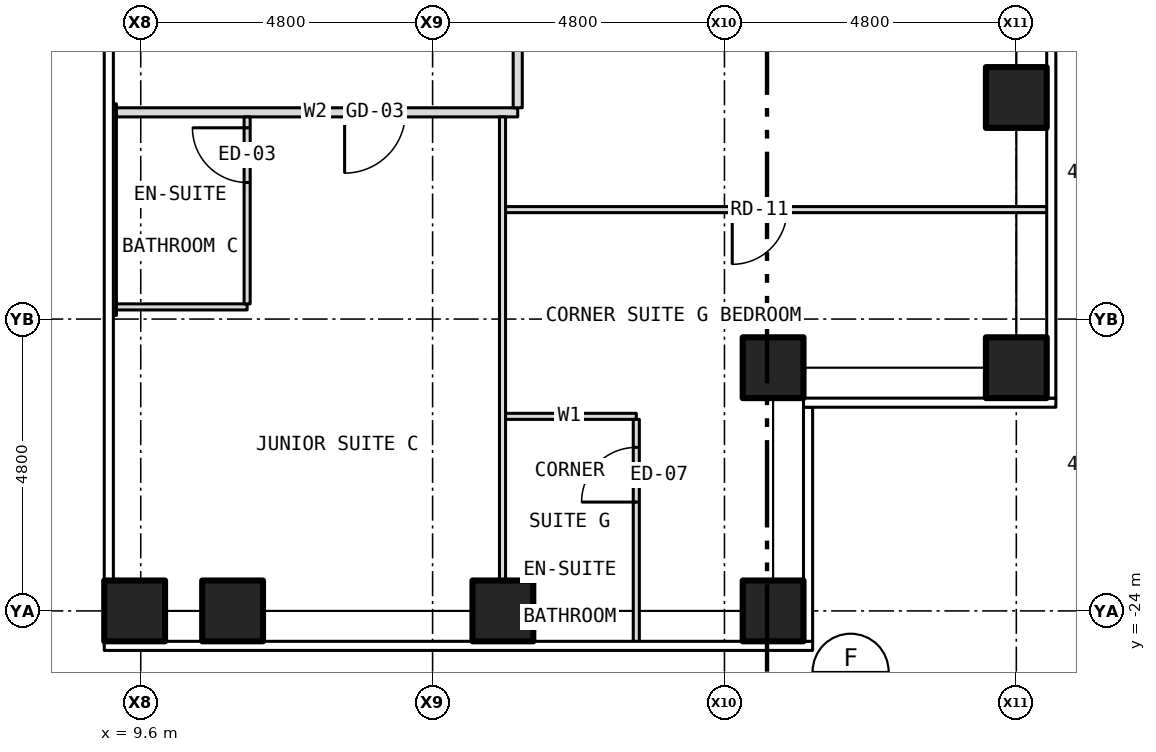
"""IFC4 building model, lengths in metres.
Left out: names, types, materials, properties, quantities, classifications, styles, units other than length and angle.
Written with IfcOpenShell. Run it as: python <this file> out.ifc"""

import sys

from ifc_helpers import new_model, si_unit, direction, frame, frame_2d, origin, origin_2d, place, context, subcontext, project, spatial, rectangle, hollow_rectangle, extrude, element, fill, save


model = new_model("IFC4")
c1 = context("Model", 3, precision=1e-05, world=origin(), true_north=direction((0.0, 1.0)))
c2 = subcontext(c1, "Body", "Model", "MODEL_VIEW")
j1 = project(units=[si_unit("LENGTHUNIT", "METRE"), si_unit("PLANEANGLEUNIT", "RADIAN")], contexts=[c1])
p1 = place(None, origin())
s1 = spatial("IfcSite", under=j1, at=p1, CompositionType="ELEMENT")
p2 = place(p1, origin())
s2 = spatial("IfcBuilding", under=s1, at=p2, CompositionType="ELEMENT")
p3 = place(p2, frame((0.0, 0.0, 77.5)))
s3 = spatial("IfcBuildingStorey", under=s2, at=p3, CompositionType="ELEMENT", Elevation=77.5)
for number, where, z_axis, x_axis in (
    (1, (11.111, -24.0, -0.15), (0.0, 0.0, 1.0), (1.0, 0.0, 0.0)),
    (2, (15.556, -24.0, -0.15), (0.0, 0.0, 1.0), (1.0, 0.0, 0.0)),
    (3, (20.0, -24.0, -0.15), (0.0, 0.0, 1.0), (1.0, 0.0, 0.0)),
    (4, (24.0, -20.0, -0.15), (0.0, 0.0, 1.0), (1.0, 0.0, 0.0)),
    (5, (24.0, -15.556, -0.15), (0.0, 0.0, 1.0), (1.0, 0.0, 0.0)),
    (6, (20.0, -20.0, -0.15), (0.0, 0.0, 1.0), (1.0, 0.0, 0.0)),
    (7, (9.5, -24.0, -0.15), (0.0, 0.0, 1.0), (1.0, 0.0, 0.0)),
):
    element("IfcColumn", number, at=place(p3, frame(where, z_axis=z_axis, x_axis=x_axis)), inside=s3, PredefinedType="COLUMN", context=c2, shape_type="SweptSolid", body=[
        extrude(hollow_rectangle(XDim=1.0, YDim=1.0, WallThickness=0.06, at=origin_2d()), origin(), (0.0, 0.0, 1.0), 3.5),
    ])
p4 = place(p3, frame((15.55, -20.8, 0.0), z_axis=(0.0, 0.0, 1.0), x_axis=(1.0, 0.0, 0.0)))
e8 = element("IfcWall", 8, at=p4, inside=s3, PredefinedType="PARTITIONING", context=c2, shape_type="SweptSolid", body=[
    extrude(rectangle(XDim=2.2, YDim=0.1, at=frame_2d((1.1, 0.0))), origin(), (0.0, 0.0, 1.0), 3.35),
])
p5 = place(p3, frame((9.15, -19.0, 0.0), z_axis=(0.0, 0.0, 1.0), x_axis=(1.0, 0.0, 0.0)))
e9 = element("IfcWall", 9, at=p5, inside=s3, PredefinedType="PARTITIONING", context=c2, shape_type="SweptSolid", body=[
    extrude(rectangle(XDim=2.2, YDim=0.1, at=frame_2d((1.1, 0.0))), origin(), (0.0, 0.0, 1.0), 3.35),
])
p6 = place(p3, frame((15.55, -17.4, 0.0), z_axis=(0.0, 0.0, 1.0), x_axis=(1.0, 0.0, 0.0)))
e10 = element("IfcWall", 10, at=p6, inside=s3, PredefinedType="PARTITIONING", context=c2, shape_type="SweptSolid", body=[
    extrude(rectangle(XDim=8.98, YDim=0.1, at=frame_2d((4.49, 0.0))), origin(), (0.0, 0.0, 1.0), 3.35),
])
p7 = place(p6, frame((3.778, 0.0, 0.0)))
e11 = element("IfcOpeningElement", 11, at=p7, cuts=e10, PredefinedType="OPENING", context=c2, shape_type="SweptSolid", body=[
    extrude(rectangle(XDim=0.9, YDim=2.1, at=frame_2d((0.45, 1.05))), frame((0.0, 0.062, 0.0), z_axis=(0.0, -1.0, 0.0), x_axis=(1.0, 0.0, 0.0)), (0.0, 0.0, 1.0), 0.124),
])
p8 = place(p3, frame((9.15, -15.8, 0.0), z_axis=(0.0, 0.0, 1.0), x_axis=(1.0, 0.0, 0.0)))
e12 = element("IfcWall", 12, at=p8, inside=s3, PredefinedType="PARTITIONING", context=c2, shape_type="SweptSolid", body=[
    extrude(rectangle(XDim=6.65, YDim=0.15, at=frame_2d((3.325, 0.0))), origin(), (0.0, 0.0, 1.0), 3.35),
])
p9 = place(p8, frame((3.803, 0.0, 0.0)))
e13 = element("IfcOpeningElement", 13, at=p9, cuts=e12, PredefinedType="OPENING", context=c2, shape_type="SweptSolid", body=[
    extrude(rectangle(XDim=1.0, YDim=2.1, at=frame_2d((0.5, 1.05))), frame((0.0, 0.087, 0.0), z_axis=(0.0, -1.0, 0.0), x_axis=(1.0, 0.0, 0.0)), (0.0, 0.0, 1.0), 0.174),
])
p10 = place(p3, frame((9.15, -19.14, 0.0), z_axis=(0.0, 0.0, 1.0), x_axis=(0.0, 1.0, 0.0)))
e14 = element("IfcWall", 14, at=p10, inside=s3, PredefinedType="PARTITIONING", context=c2, shape_type="SweptSolid", body=[
    extrude(rectangle(XDim=3.48, YDim=0.1, at=frame_2d((1.74, 0.0))), origin(), (0.0, 0.0, 1.0), 2.733),
])
p11 = place(p3, frame((11.35, -18.95, 0.0), z_axis=(0.0, 0.0, 1.0), x_axis=(0.0, 1.0, 0.0)))
e15 = element("IfcWall", 15, at=p11, inside=s3, PredefinedType="PARTITIONING", context=c2, shape_type="SweptSolid", body=[
    extrude(rectangle(XDim=3.075, YDim=0.1, at=frame_2d((1.538, 0.0))), origin(), (0.0, 0.0, 1.0), 3.35),
])
p12 = place(p11, frame((1.996, 0.0, 0.0)))
e16 = element("IfcOpeningElement", 16, at=p12, cuts=e15, PredefinedType="OPENING", context=c2, shape_type="SweptSolid", body=[
    extrude(rectangle(XDim=0.9, YDim=2.1, at=frame_2d((0.45, 1.05))), frame((0.0, 0.062, 0.0), z_axis=(0.0, -1.0, 0.0), x_axis=(1.0, 0.0, 0.0)), (0.0, 0.0, 1.0), 0.124),
])
p13 = place(p3, frame((15.55, -23.88, 0.0), z_axis=(0.0, 0.0, 1.0), x_axis=(0.0, 1.0, 0.0)))
e17 = element("IfcWall", 17, at=p13, inside=s3, PredefinedType="PARTITIONING", context=c2, shape_type="SweptSolid", body=[
    extrude(rectangle(XDim=8.005, YDim=0.1, at=frame_2d((4.002, 0.0))), origin(), (0.0, 0.0, 1.0), 3.35),
])
p14 = place(p3, frame((15.8, -15.725, 0.0), z_axis=(0.0, 0.0, 1.0), x_axis=(0.0, 1.0, 0.0)))
e18 = element("IfcWall", 18, at=p14, inside=s3, PredefinedType="PARTITIONING", context=c2, shape_type="SweptSolid", body=[
    extrude(rectangle(XDim=4.805, YDim=0.15, at=frame_2d((2.403, 0.0))), origin(), (0.0, 0.0, 1.0), 3.35),
])
p15 = place(p14, frame((3.025, 0.0, 0.0)))
e19 = element("IfcOpeningElement", 19, at=p15, cuts=e18, PredefinedType="OPENING", context=c2, shape_type="SweptSolid", body=[
    extrude(rectangle(XDim=1.0, YDim=2.1, at=frame_2d((0.5, 1.05))), frame((0.0, 0.087, 0.0), z_axis=(0.0, -1.0, 0.0), x_axis=(1.0, 0.0, 0.0)), (0.0, 0.0, 1.0), 0.174),
])
p16 = place(p3, frame((17.75, -24.53, 0.0), z_axis=(0.0, 0.0, 1.0), x_axis=(0.0, 1.0, 0.0)))
e20 = element("IfcWall", 20, at=p16, inside=s3, PredefinedType="PARTITIONING", context=c2, shape_type="SweptSolid", body=[
    extrude(rectangle(XDim=3.68, YDim=0.1, at=frame_2d((1.84, 0.0))), origin(), (0.0, 0.0, 1.0), 3.35),
])
p17 = place(p16, frame((2.32, 0.0, 0.0)))
e21 = element("IfcOpeningElement", 21, at=p17, cuts=e20, PredefinedType="OPENING", context=c2, shape_type="SweptSolid", body=[
    extrude(rectangle(XDim=0.9, YDim=2.1, at=frame_2d((0.45, 1.05))), frame((0.0, 0.062, 0.0), z_axis=(0.0, -1.0, 0.0), x_axis=(1.0, 0.0, 0.0)), (0.0, 0.0, 1.0), 0.124),
])
p18 = place(p9, origin())
e22 = element("IfcDoor", 22, at=p18, inside=s3, OperationType="SINGLE_SWING_LEFT", PredefinedType="DOOR", context=c2, shape_type="SweptSolid", body=[
    extrude(rectangle(XDim=1.0, YDim=2.1, at=frame_2d((0.5, 1.05))), frame((0.0, 0.025, 0.0), z_axis=(0.0, -1.0, 0.0), x_axis=(1.0, 0.0, 0.0)), (0.0, 0.0, 1.0), 0.05),
])
fill(e13, e22)
p19 = place(p12, origin())
e23 = element("IfcDoor", 23, at=p19, inside=s3, OperationType="SINGLE_SWING_RIGHT", PredefinedType="DOOR", context=c2, shape_type="SweptSolid", body=[
    extrude(rectangle(XDim=0.9, YDim=2.1, at=frame_2d((0.45, 1.05))), frame((0.0, 0.025, 0.0), z_axis=(0.0, -1.0, 0.0), x_axis=(1.0, 0.0, 0.0)), (0.0, 0.0, 1.0), 0.05),
])
fill(e16, e23)
p20 = place(p7, origin())
e24 = element("IfcDoor", 24, at=p20, inside=s3, OperationType="SINGLE_SWING_LEFT", PredefinedType="DOOR", context=c2, shape_type="SweptSolid", body=[
    extrude(rectangle(XDim=0.9, YDim=2.1, at=frame_2d((0.45, 1.05))), frame((0.0, 0.025, 0.0), z_axis=(0.0, -1.0, 0.0), x_axis=(1.0, 0.0, 0.0)), (0.0, 0.0, 1.0), 0.05),
])
fill(e11, e24)
p21 = place(p17, origin())
e25 = element("IfcDoor", 25, at=p21, inside=s3, OperationType="SINGLE_SWING_LEFT", PredefinedType="DOOR", context=c2, shape_type="SweptSolid", body=[
    extrude(rectangle(XDim=0.9, YDim=2.1, at=frame_2d((0.45, 1.05))), frame((0.0, 0.025, 0.0), z_axis=(0.0, -1.0, 0.0), x_axis=(1.0, 0.0, 0.0)), (0.0, 0.0, 1.0), 0.05),
])
fill(e21, e25)
save(model, sys.argv[1])
